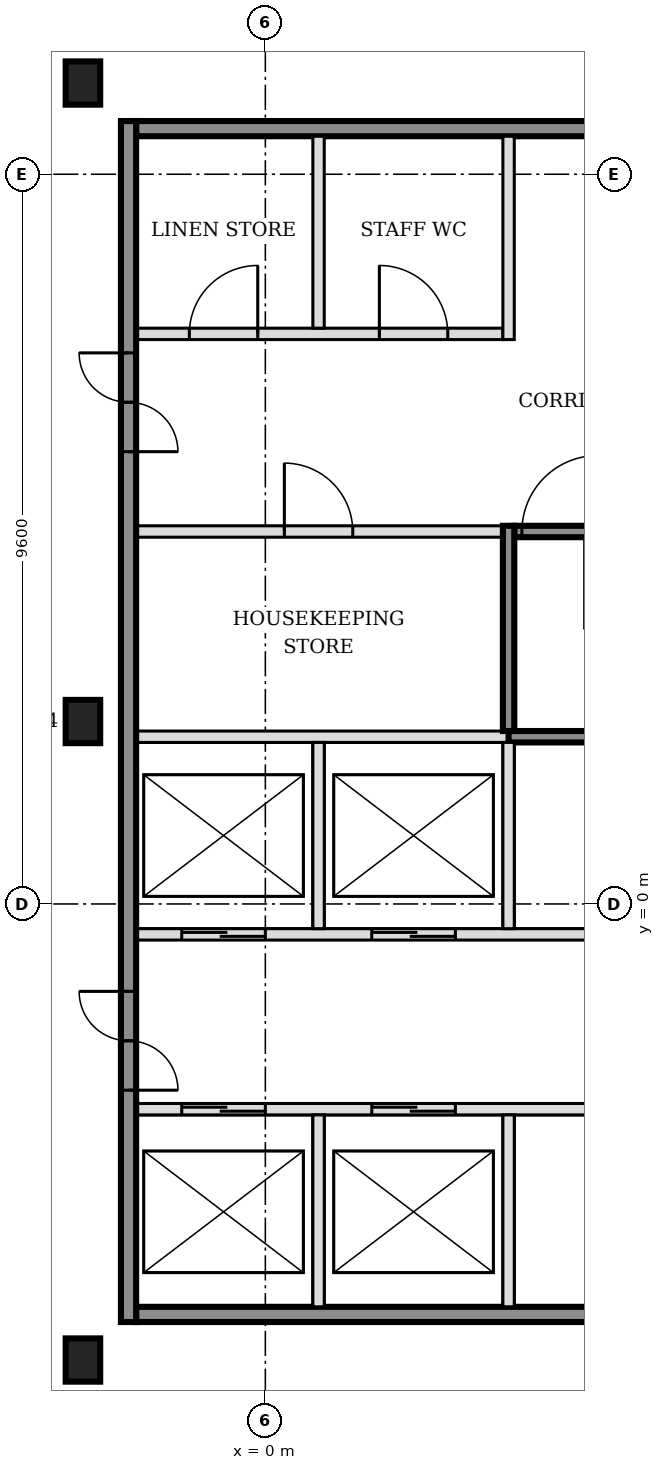
"""IFC4 building model, lengths in metres.
Left out: names, types, materials, properties, quantities, classifications, styles, units other than length and angle.
Written with IfcOpenShell. Run it as: python <this file> out.ifc"""

import sys

from ifc_helpers import new_model, si_unit, direction, frame, frame_2d, origin, origin_2d, place, context, subcontext, project, spatial, rectangle, i_section, extrude, element, fill, save


model = new_model("IFC4")
c1 = context("Model", 3, precision=1e-05, world=origin(), true_north=direction((0.0, 1.0)))
c2 = subcontext(c1, "Body", "Model", "MODEL_VIEW")
j1 = project(units=[si_unit("LENGTHUNIT", "METRE"), si_unit("PLANEANGLEUNIT", "RADIAN")], contexts=[c1])
p1 = place(None, origin())
s1 = spatial("IfcSite", under=j1, at=p1, CompositionType="ELEMENT")
p2 = place(p1, origin())
s2 = spatial("IfcBuilding", under=s1, at=p2, CompositionType="ELEMENT")
p3 = place(p2, frame((0.0, 0.0, 25.8)))
s3 = spatial("IfcBuildingStorey", under=s2, at=p3, CompositionType="ELEMENT", Elevation=25.8)
for number, where, z_axis, x_axis in (
    (1, (-2.4, -6.0, -0.2), (0.0, 0.0, 1.0), (1.0, 0.0, 0.0)),
    (2, (-2.4, 2.4, -0.2), (0.0, 0.0, 1.0), (1.0, 0.0, 0.0)),
    (3, (-2.4, 10.8, -0.2), (0.0, 0.0, 1.0), (1.0, 0.0, 0.0)),
):
    element("IfcColumn", number, at=place(p3, frame(where, z_axis=z_axis, x_axis=x_axis)), inside=s3, PredefinedType="COLUMN", context=c2, shape_type="SweptSolid", body=[
        extrude(i_section(OverallWidth=0.454, OverallDepth=0.569, WebThickness=0.078, FlangeThickness=0.125, FilletRadius=0.015, at=origin_2d()), origin(), (0.0, 0.0, 1.0), 4.8),
    ])
p4 = place(p3, frame((-1.7, -5.4, 0.0), z_axis=(0.0, 0.0, 1.0), x_axis=(1.0, 0.0, 0.0)))
e4 = element("IfcWall", 4, at=p4, inside=s3, PredefinedType="SOLIDWALL", context=c2, shape_type="SweptSolid", body=[
    extrude(rectangle(XDim=7.9, YDim=0.2, at=frame_2d((3.95, 0.0))), origin(), (0.0, 0.0, 1.0), 4.6),
])
p5 = place(p3, frame((-1.7, -2.7, 0.0), z_axis=(0.0, 0.0, 1.0), x_axis=(1.0, 0.0, 0.0)))
e5 = element("IfcWall", 5, at=p5, inside=s3, PredefinedType="SOLIDWALL", context=c2, shape_type="SweptSolid", body=[
    extrude(rectangle(XDim=7.9, YDim=0.15, at=frame_2d((3.95, 0.0))), origin(), (0.0, 0.0, 1.0), 4.6),
])
p6 = place(p5, frame((0.6, 0.0, 0.0)))
e6 = element("IfcOpeningElement", 6, at=p6, cuts=e5, PredefinedType="OPENING", context=c2, shape_type="SweptSolid", body=[
    extrude(rectangle(XDim=1.1, YDim=2.1, at=frame_2d((0.55, 1.05))), frame((0.0, 0.085, 0.0), z_axis=(0.0, -1.0, 0.0), x_axis=(1.0, 0.0, 0.0)), (0.0, 0.0, 1.0), 0.17),
])
p7 = place(p5, frame((3.1, 0.0, 0.0)))
e7 = element("IfcOpeningElement", 7, at=p7, cuts=e5, PredefinedType="OPENING", context=c2, shape_type="SweptSolid", body=[
    extrude(rectangle(XDim=1.1, YDim=2.1, at=frame_2d((0.55, 1.05))), frame((0.0, 0.085, 0.0), z_axis=(0.0, -1.0, 0.0), x_axis=(1.0, 0.0, 0.0)), (0.0, 0.0, 1.0), 0.17),
])
p8 = place(p3, frame((-1.7, -0.4, 0.0), z_axis=(0.0, 0.0, 1.0), x_axis=(1.0, 0.0, 0.0)))
e8 = element("IfcWall", 8, at=p8, inside=s3, PredefinedType="SOLIDWALL", context=c2, shape_type="SweptSolid", body=[
    extrude(rectangle(XDim=15.925, YDim=0.15, at=frame_2d((7.962, 0.0))), origin(), (0.0, 0.0, 1.0), 4.6),
])
p9 = place(p8, frame((0.6, 0.0, 0.0)))
e9 = element("IfcOpeningElement", 9, at=p9, cuts=e8, PredefinedType="OPENING", context=c2, shape_type="SweptSolid", body=[
    extrude(rectangle(XDim=1.1, YDim=2.1, at=frame_2d((0.55, 1.05))), frame((0.0, 0.085, 0.0), z_axis=(0.0, -1.0, 0.0), x_axis=(1.0, 0.0, 0.0)), (0.0, 0.0, 1.0), 0.17),
])
p10 = place(p8, frame((3.1, 0.0, 0.0)))
e10 = element("IfcOpeningElement", 10, at=p10, cuts=e8, PredefinedType="OPENING", context=c2, shape_type="SweptSolid", body=[
    extrude(rectangle(XDim=1.1, YDim=2.1, at=frame_2d((0.55, 1.05))), frame((0.0, 0.085, 0.0), z_axis=(0.0, -1.0, 0.0), x_axis=(1.0, 0.0, 0.0)), (0.0, 0.0, 1.0), 0.17),
])
p11 = place(p8, frame((11.575, 0.0, 0.0)))
e11 = element("IfcOpeningElement", 11, at=p11, cuts=e8, PredefinedType="OPENING", context=c2, shape_type="SweptSolid", body=[
    extrude(rectangle(XDim=1.2, YDim=2.1, at=frame_2d((0.6, 1.05))), frame((0.0, 0.085, 0.0), z_axis=(0.0, -1.0, 0.0), x_axis=(1.0, 0.0, 0.0)), (0.0, 0.0, 1.0), 0.17),
])
p12 = place(p8, frame((14.125, 0.0, 0.0)))
e12 = element("IfcOpeningElement", 12, at=p12, cuts=e8, PredefinedType="OPENING", context=c2, shape_type="SweptSolid", body=[
    extrude(rectangle(XDim=1.2, YDim=2.1, at=frame_2d((0.6, 1.05))), frame((0.0, 0.085, 0.0), z_axis=(0.0, -1.0, 0.0), x_axis=(1.0, 0.0, 0.0)), (0.0, 0.0, 1.0), 0.17),
])
p13 = place(p3, frame((-1.7, 2.2, 0.0), z_axis=(0.0, 0.0, 1.0), x_axis=(1.0, 0.0, 0.0)))
e13 = element("IfcWall", 13, at=p13, inside=s3, PredefinedType="SOLIDWALL", context=c2, shape_type="SweptSolid", body=[
    extrude(rectangle(XDim=4.9, YDim=0.15, at=frame_2d((2.45, 0.0))), origin(), (0.0, 0.0, 1.0), 4.6),
])
p14 = place(p3, frame((3.2, 2.2, 0.0), z_axis=(0.0, 0.0, 1.0), x_axis=(1.0, 0.0, 0.0)))
e14 = element("IfcWall", 14, at=p14, inside=s3, PredefinedType="SOLIDWALL", context=c2, shape_type="SweptSolid", body=[
    extrude(rectangle(XDim=6.5, YDim=0.15, at=frame_2d((3.25, 0.0))), origin(), (0.0, 0.0, 1.0), 4.6),
])
p15 = place(p3, frame((-1.7, 4.9, 0.0), z_axis=(0.0, 0.0, 1.0), x_axis=(1.0, 0.0, 0.0)))
e15 = element("IfcWall", 15, at=p15, inside=s3, PredefinedType="PARTITIONING", context=c2, shape_type="SweptSolid", body=[
    extrude(rectangle(XDim=4.825, YDim=0.15, at=frame_2d((2.413, 0.0))), origin(), (0.0, 0.0, 1.0), 4.6),
])
p16 = place(p15, frame((1.95, 0.0, 0.0)))
e16 = element("IfcOpeningElement", 16, at=p16, cuts=e15, PredefinedType="OPENING", context=c2, shape_type="SweptSolid", body=[
    extrude(rectangle(XDim=0.9, YDim=2.1, at=frame_2d((0.45, 1.05))), frame((0.0, 0.085, 0.0), z_axis=(0.0, -1.0, 0.0), x_axis=(1.0, 0.0, 0.0)), (0.0, 0.0, 1.0), 0.17),
])
p17 = place(p3, frame((3.275, 4.9, 0.0), z_axis=(0.0, 0.0, 1.0), x_axis=(1.0, 0.0, 0.0)))
e17 = element("IfcWall", 17, at=p17, inside=s3, PredefinedType="SOLIDWALL", context=c2, shape_type="SweptSolid", body=[
    extrude(rectangle(XDim=6.425, YDim=0.15, at=frame_2d((3.212, 0.0))), origin(), (0.0, 0.0, 1.0), 4.6),
])
p18 = place(p17, frame((0.1, 0.0, 0.0)))
e18 = element("IfcOpeningElement", 18, at=p18, cuts=e17, PredefinedType="OPENING", context=c2, shape_type="SweptSolid", body=[
    extrude(rectangle(XDim=1.0, YDim=2.1, at=frame_2d((0.5, 1.05))), frame((0.0, 0.085, 0.0), z_axis=(0.0, -1.0, 0.0), x_axis=(1.0, 0.0, 0.0)), (0.0, 0.0, 1.0), 0.17),
])
p19 = place(p3, frame((-1.7, 7.5, 0.0), z_axis=(0.0, 0.0, 1.0), x_axis=(1.0, 0.0, 0.0)))
e19 = element("IfcWall", 19, at=p19, inside=s3, PredefinedType="PARTITIONING", context=c2, shape_type="SweptSolid", body=[
    extrude(rectangle(XDim=4.825, YDim=0.15, at=frame_2d((2.413, 0.0))), origin(), (0.0, 0.0, 1.0), 4.6),
])
p20 = place(p19, frame((0.7, 0.0, 0.0)))
e20 = element("IfcOpeningElement", 20, at=p20, cuts=e19, PredefinedType="OPENING", context=c2, shape_type="SweptSolid", body=[
    extrude(rectangle(XDim=0.9, YDim=2.1, at=frame_2d((0.45, 1.05))), frame((0.0, 0.085, 0.0), z_axis=(0.0, -1.0, 0.0), x_axis=(1.0, 0.0, 0.0)), (0.0, 0.0, 1.0), 0.17),
])
p21 = place(p19, frame((3.2, 0.0, 0.0)))
e21 = element("IfcOpeningElement", 21, at=p21, cuts=e19, PredefinedType="OPENING", context=c2, shape_type="SweptSolid", body=[
    extrude(rectangle(XDim=0.9, YDim=2.1, at=frame_2d((0.45, 1.05))), frame((0.0, 0.085, 0.0), z_axis=(0.0, -1.0, 0.0), x_axis=(1.0, 0.0, 0.0)), (0.0, 0.0, 1.0), 0.17),
])
p22 = place(p3, frame((-1.7, 10.2, 0.0), z_axis=(0.0, 0.0, 1.0), x_axis=(1.0, 0.0, 0.0)))
e22 = element("IfcWall", 22, at=p22, inside=s3, PredefinedType="SOLIDWALL", context=c2, shape_type="SweptSolid", body=[
    extrude(rectangle(XDim=7.9, YDim=0.2, at=frame_2d((3.95, 0.0))), origin(), (0.0, 0.0, 1.0), 4.6),
])
p23 = place(p3, frame((-1.8, -5.5, 0.0), z_axis=(0.0, 0.0, 1.0), x_axis=(0.0, 1.0, 0.0)))
e23 = element("IfcWall", 23, at=p23, inside=s3, PredefinedType="SOLIDWALL", context=c2, shape_type="SweptSolid", body=[
    extrude(rectangle(XDim=15.8, YDim=0.2, at=frame_2d((7.9, 0.0))), origin(), (0.0, 0.0, 1.0), 4.6),
])
p24 = place(p23, frame((3.05, 0.0, 0.0)))
e24 = element("IfcOpeningElement", 24, at=p24, cuts=e23, PredefinedType="OPENING", context=c2, shape_type="SweptSolid", body=[
    extrude(rectangle(XDim=1.3, YDim=2.1, at=frame_2d((0.65, 1.05))), frame((0.0, 0.11, 0.0), z_axis=(0.0, -1.0, 0.0), x_axis=(1.0, 0.0, 0.0)), (0.0, 0.0, 1.0), 0.22),
])
p25 = place(p23, frame((11.45, 0.0, 0.0)))
e25 = element("IfcOpeningElement", 25, at=p25, cuts=e23, PredefinedType="OPENING", context=c2, shape_type="SweptSolid", body=[
    extrude(rectangle(XDim=1.3, YDim=2.1, at=frame_2d((0.65, 1.05))), frame((0.0, 0.11, 0.0), z_axis=(0.0, -1.0, 0.0), x_axis=(1.0, 0.0, 0.0)), (0.0, 0.0, 1.0), 0.22),
])
p26 = place(p3, frame((0.7, -5.3, 0.0), z_axis=(0.0, 0.0, 1.0), x_axis=(0.0, 1.0, 0.0)))
e26 = element("IfcWall", 26, at=p26, inside=s3, PredefinedType="SOLIDWALL", context=c2, shape_type="SweptSolid", body=[
    extrude(rectangle(XDim=2.525, YDim=0.15, at=frame_2d((1.263, 0.0))), origin(), (0.0, 0.0, 1.0), 4.6),
])
p27 = place(p3, frame((0.7, -0.325, 0.0), z_axis=(0.0, 0.0, 1.0), x_axis=(0.0, 1.0, 0.0)))
e27 = element("IfcWall", 27, at=p27, inside=s3, PredefinedType="SOLIDWALL", context=c2, shape_type="SweptSolid", body=[
    extrude(rectangle(XDim=2.45, YDim=0.15, at=frame_2d((1.225, 0.0))), origin(), (0.0, 0.0, 1.0), 4.6),
])
p28 = place(p3, frame((0.7, 7.575, 0.0), z_axis=(0.0, 0.0, 1.0), x_axis=(0.0, 1.0, 0.0)))
e28 = element("IfcWall", 28, at=p28, inside=s3, PredefinedType="PARTITIONING", context=c2, shape_type="SweptSolid", body=[
    extrude(rectangle(XDim=2.525, YDim=0.15, at=frame_2d((1.263, 0.0))), origin(), (0.0, 0.0, 1.0), 4.6),
])
p29 = place(p3, frame((3.2, -5.3, 0.0), z_axis=(0.0, 0.0, 1.0), x_axis=(0.0, 1.0, 0.0)))
e29 = element("IfcWall", 29, at=p29, inside=s3, PredefinedType="SOLIDWALL", context=c2, shape_type="SweptSolid", body=[
    extrude(rectangle(XDim=2.525, YDim=0.15, at=frame_2d((1.263, 0.0))), origin(), (0.0, 0.0, 1.0), 4.6),
])
p30 = place(p3, frame((3.2, -0.325, 0.0), z_axis=(0.0, 0.0, 1.0), x_axis=(0.0, 1.0, 0.0)))
e30 = element("IfcWall", 30, at=p30, inside=s3, PredefinedType="SOLIDWALL", context=c2, shape_type="SweptSolid", body=[
    extrude(rectangle(XDim=2.45, YDim=0.15, at=frame_2d((1.225, 0.0))), origin(), (0.0, 0.0, 1.0), 4.6),
])
p31 = place(p3, frame((3.2, 2.275, 0.0), z_axis=(0.0, 0.0, 1.0), x_axis=(0.0, 1.0, 0.0)))
e31 = element("IfcWall", 31, at=p31, inside=s3, PredefinedType="SOLIDWALL", context=c2, shape_type="SweptSolid", body=[
    extrude(rectangle(XDim=2.7, YDim=0.15, at=frame_2d((1.35, 0.0))), origin(), (0.0, 0.0, 1.0), 4.6),
])
p32 = place(p3, frame((3.2, 7.425, 0.0), z_axis=(0.0, 0.0, 1.0), x_axis=(0.0, 1.0, 0.0)))
e32 = element("IfcWall", 32, at=p32, inside=s3, PredefinedType="PARTITIONING", context=c2, shape_type="SweptSolid", body=[
    extrude(rectangle(XDim=2.675, YDim=0.15, at=frame_2d((1.337, 0.0))), origin(), (0.0, 0.0, 1.0), 4.6),
])
p33 = place(p6, origin())
e33 = element("IfcDoor", 33, at=p33, inside=s3, OperationType="DOUBLE_DOOR_SLIDING", PredefinedType="DOOR", context=c2, shape_type="SweptSolid", body=[
    extrude(rectangle(XDim=1.1, YDim=2.1, at=frame_2d((0.55, 1.05))), frame((0.0, 0.025, 0.0), z_axis=(0.0, -1.0, 0.0), x_axis=(1.0, 0.0, 0.0)), (0.0, 0.0, 1.0), 0.05),
])
fill(e6, e33)
p34 = place(p7, origin())
e34 = element("IfcDoor", 34, at=p34, inside=s3, OperationType="DOUBLE_DOOR_SLIDING", PredefinedType="DOOR", context=c2, shape_type="SweptSolid", body=[
    extrude(rectangle(XDim=1.1, YDim=2.1, at=frame_2d((0.55, 1.05))), frame((0.0, 0.025, 0.0), z_axis=(0.0, -1.0, 0.0), x_axis=(1.0, 0.0, 0.0)), (0.0, 0.0, 1.0), 0.05),
])
fill(e7, e34)
p35 = place(p9, origin())
e35 = element("IfcDoor", 35, at=p35, inside=s3, OperationType="DOUBLE_DOOR_SLIDING", PredefinedType="DOOR", context=c2, shape_type="SweptSolid", body=[
    extrude(rectangle(XDim=1.1, YDim=2.1, at=frame_2d((0.55, 1.05))), frame((0.0, 0.025, 0.0), z_axis=(0.0, -1.0, 0.0), x_axis=(1.0, 0.0, 0.0)), (0.0, 0.0, 1.0), 0.05),
])
fill(e9, e35)
p36 = place(p10, origin())
e36 = element("IfcDoor", 36, at=p36, inside=s3, OperationType="DOUBLE_DOOR_SLIDING", PredefinedType="DOOR", context=c2, shape_type="SweptSolid", body=[
    extrude(rectangle(XDim=1.1, YDim=2.1, at=frame_2d((0.55, 1.05))), frame((0.0, 0.025, 0.0), z_axis=(0.0, -1.0, 0.0), x_axis=(1.0, 0.0, 0.0)), (0.0, 0.0, 1.0), 0.05),
])
fill(e10, e36)
p37 = place(p18, origin())
e37 = element("IfcDoor", 37, at=p37, inside=s3, OperationType="SINGLE_SWING_RIGHT", PredefinedType="DOOR", context=c2, shape_type="SweptSolid", body=[
    extrude(rectangle(XDim=1.0, YDim=2.1, at=frame_2d((0.5, 1.05))), frame((0.0, 0.025, 0.0), z_axis=(0.0, -1.0, 0.0), x_axis=(1.0, 0.0, 0.0)), (0.0, 0.0, 1.0), 0.05),
])
fill(e18, e37)
p38 = place(p24, origin())
e38 = element("IfcDoor", 38, at=p38, inside=s3, OperationType="DOUBLE_DOOR_SINGLE_SWING", PredefinedType="DOOR", context=c2, shape_type="SweptSolid", body=[
    extrude(rectangle(XDim=1.3, YDim=2.1, at=frame_2d((0.65, 1.05))), frame((0.0, 0.025, 0.0), z_axis=(0.0, -1.0, 0.0), x_axis=(1.0, 0.0, 0.0)), (0.0, 0.0, 1.0), 0.05),
])
fill(e24, e38)
p39 = place(p25, origin())
e39 = element("IfcDoor", 39, at=p39, inside=s3, OperationType="DOUBLE_DOOR_SINGLE_SWING", PredefinedType="DOOR", context=c2, shape_type="SweptSolid", body=[
    extrude(rectangle(XDim=1.3, YDim=2.1, at=frame_2d((0.65, 1.05))), frame((0.0, 0.025, 0.0), z_axis=(0.0, -1.0, 0.0), x_axis=(1.0, 0.0, 0.0)), (0.0, 0.0, 1.0), 0.05),
])
fill(e25, e39)
p40 = place(p16, origin())
e40 = element("IfcDoor", 40, at=p40, inside=s3, OperationType="SINGLE_SWING_LEFT", PredefinedType="DOOR", context=c2, shape_type="SweptSolid", body=[
    extrude(rectangle(XDim=0.9, YDim=2.1, at=frame_2d((0.45, 1.05))), frame((0.0, 0.025, 0.0), z_axis=(0.0, -1.0, 0.0), x_axis=(1.0, 0.0, 0.0)), (0.0, 0.0, 1.0), 0.05),
])
fill(e16, e40)
p41 = place(p20, origin())
e41 = element("IfcDoor", 41, at=p41, inside=s3, OperationType="SINGLE_SWING_RIGHT", PredefinedType="DOOR", context=c2, shape_type="SweptSolid", body=[
    extrude(rectangle(XDim=0.9, YDim=2.1, at=frame_2d((0.45, 1.05))), frame((0.0, 0.025, 0.0), z_axis=(0.0, -1.0, 0.0), x_axis=(1.0, 0.0, 0.0)), (0.0, 0.0, 1.0), 0.05),
])
fill(e20, e41)
p42 = place(p21, origin())
e42 = element("IfcDoor", 42, at=p42, inside=s3, OperationType="SINGLE_SWING_LEFT", PredefinedType="DOOR", context=c2, shape_type="SweptSolid", body=[
    extrude(rectangle(XDim=0.9, YDim=2.1, at=frame_2d((0.45, 1.05))), frame((0.0, 0.025, 0.0), z_axis=(0.0, -1.0, 0.0), x_axis=(1.0, 0.0, 0.0)), (0.0, 0.0, 1.0), 0.05),
])
fill(e21, e42)
save(model, sys.argv[1])
